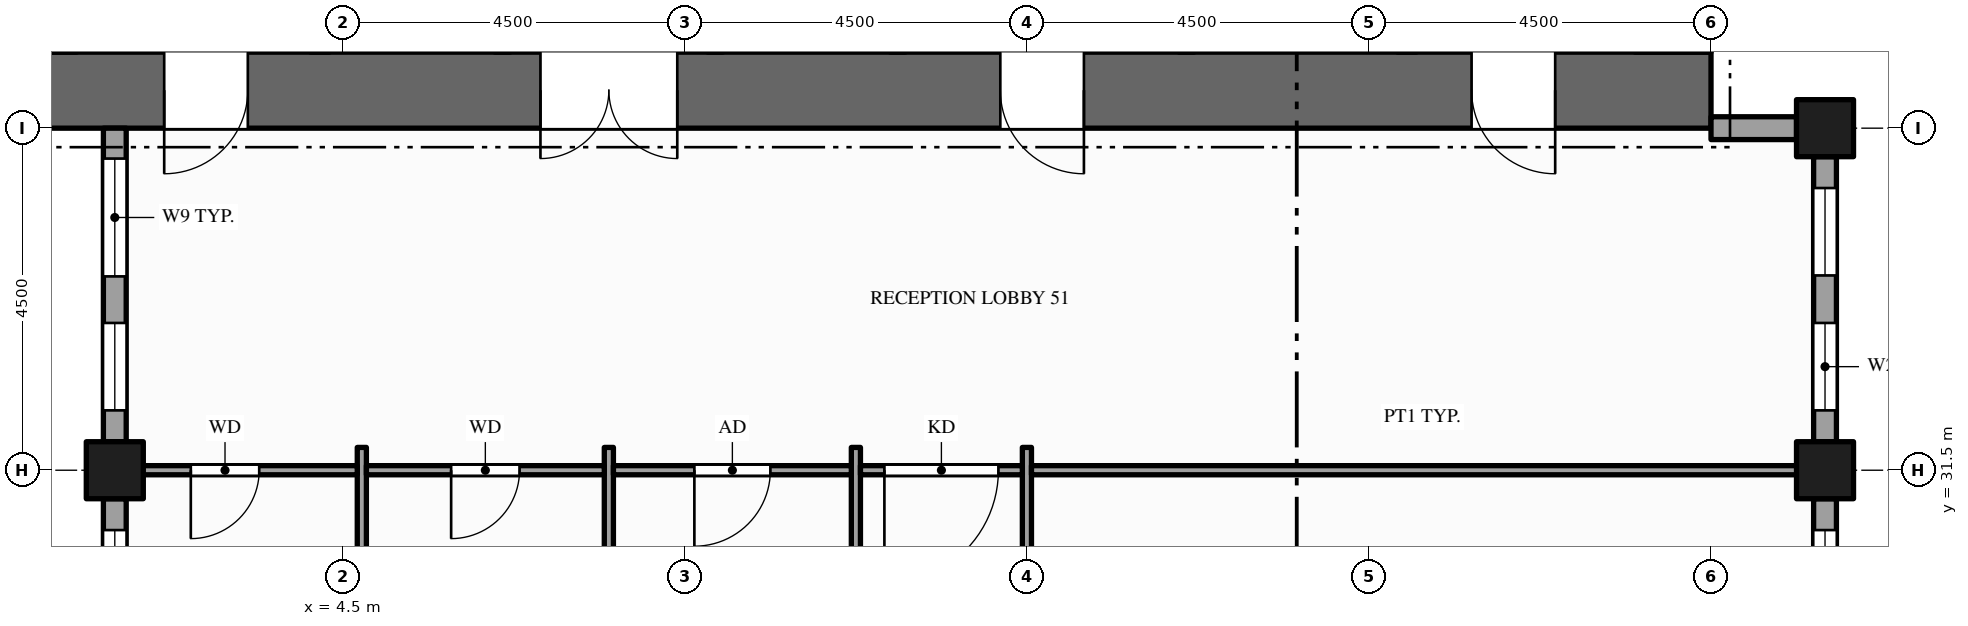
"""IFC4 building model, lengths in metres.
Left out: names, types, materials, properties, quantities, classifications, styles, units other than length and angle.
Written with IfcOpenShell. Run it as: python <this file> out.ifc"""

import sys

from ifc_helpers import new_model, si_unit, direction, frame, frame_2d, origin, origin_2d, place, context, subcontext, project, spatial, rectangle, hollow_rectangle, extrude, element, fill, save


model = new_model("IFC4")
c1 = context("Model", 3, precision=1e-05, world=origin(), true_north=direction((0.0, 1.0)))
c2 = subcontext(c1, "Body", "Model", "MODEL_VIEW")
j1 = project(units=[si_unit("LENGTHUNIT", "METRE"), si_unit("PLANEANGLEUNIT", "RADIAN")], contexts=[c1])
p1 = place(None, origin())
s1 = spatial("IfcSite", under=j1, at=p1, CompositionType="ELEMENT")
p2 = place(p1, origin())
s2 = spatial("IfcBuilding", under=s1, at=p2, CompositionType="ELEMENT")
p3 = place(p2, frame((0.0, 0.0, 207.0)))
s3 = spatial("IfcBuildingStorey", under=s2, at=p3, CompositionType="ELEMENT", Elevation=207.0)
p4 = place(p3, frame((0.0, 36.5, -0.15), z_axis=(0.0, 0.0, 1.0), x_axis=(1.0, 0.0, 0.0)))
e1 = element("IfcWall", 1, at=p4, inside=s3, PredefinedType="SHEAR", context=c2, shape_type="SweptSolid", body=[
    extrude(rectangle(XDim=22.5, YDim=1.0, at=frame_2d((11.25, 0.0))), origin(), (0.0, 0.0, 1.0), 4.0),
])
p5 = place(p4, frame((7.1, 0.0, 0.15)))
e2 = element("IfcOpeningElement", 2, at=p5, cuts=e1, PredefinedType="OPENING", context=c2, shape_type="SweptSolid", body=[
    extrude(rectangle(XDim=1.8, YDim=2.1, at=frame_2d((0.9, 1.05))), frame((0.0, 0.51, 0.0), z_axis=(0.0, -1.0, 0.0), x_axis=(1.0, 0.0, 0.0)), (0.0, 0.0, 1.0), 1.02),
])
p6 = place(p4, frame((13.15, 0.0, 0.15)))
e3 = element("IfcOpeningElement", 3, at=p6, cuts=e1, PredefinedType="OPENING", context=c2, shape_type="SweptSolid", body=[
    extrude(rectangle(XDim=1.1, YDim=2.1, at=frame_2d((0.55, 1.05))), frame((0.0, 0.51, 0.0), z_axis=(0.0, -1.0, 0.0), x_axis=(1.0, 0.0, 0.0)), (0.0, 0.0, 1.0), 1.02),
])
p7 = place(p4, frame((2.15, 0.0, 0.15)))
e4 = element("IfcOpeningElement", 4, at=p7, cuts=e1, PredefinedType="OPENING", context=c2, shape_type="SweptSolid", body=[
    extrude(rectangle(XDim=1.1, YDim=2.1, at=frame_2d((0.55, 1.05))), frame((0.0, 0.51, 0.0), z_axis=(0.0, -1.0, 0.0), x_axis=(1.0, 0.0, 0.0)), (0.0, 0.0, 1.0), 1.02),
])
p8 = place(p4, frame((19.35, 0.0, 0.15)))
e5 = element("IfcOpeningElement", 5, at=p8, cuts=e1, PredefinedType="OPENING", context=c2, shape_type="SweptSolid", body=[
    extrude(rectangle(XDim=1.1, YDim=2.1, at=frame_2d((0.55, 1.05))), frame((0.0, 0.51, 0.0), z_axis=(0.0, -1.0, 0.0), x_axis=(1.0, 0.0, 0.0)), (0.0, 0.0, 1.0), 1.02),
])
for number, where, z_axis, x_axis in (
    (6, (1.5, 31.5, -0.15), (0.0, 0.0, 1.0), (1.0, 0.0, 0.0)),
    (7, (24.0, 31.5, -0.15), (0.0, 0.0, 1.0), (1.0, 0.0, 0.0)),
    (8, (24.0, 36.0, -0.15), (0.0, 0.0, 1.0), (1.0, 0.0, 0.0)),
):
    element("IfcColumn", number, at=place(p3, frame(where, z_axis=z_axis, x_axis=x_axis)), inside=s3, PredefinedType="COLUMN", context=c2, shape_type="SweptSolid", body=[
        extrude(hollow_rectangle(XDim=0.75, YDim=0.75, WallThickness=0.036, at=origin_2d()), origin(), (0.0, 0.0, 1.0), 4.0),
    ])
p9 = place(p3, frame((24.0, 25.875, 0.0), z_axis=(0.0, 0.0, 1.0), x_axis=(0.0, 1.0, 0.0)))
e9 = element("IfcWall", 9, at=p9, inside=s3, PredefinedType="STANDARD", context=c2, shape_type="SweptSolid", body=[
    extrude(rectangle(XDim=5.25, YDim=0.3, at=frame_2d((2.625, 0.0))), origin(), (0.0, 0.0, 1.0), 3.157),
])
p10 = place(p9, frame((1.425, 0.0, 0.9)))
e10 = element("IfcOpeningElement", 10, at=p10, cuts=e9, PredefinedType="OPENING", context=c2, shape_type="SweptSolid", body=[
    extrude(rectangle(XDim=1.65, YDim=2.0, at=frame_2d((0.825, 1.0))), frame((0.0, 0.16, 0.0), z_axis=(0.0, -1.0, 0.0), x_axis=(1.0, 0.0, 0.0)), (0.0, 0.0, 1.0), 0.32),
])
p11 = place(p9, frame((3.688, 0.0, 0.9)))
e11 = element("IfcOpeningElement", 11, at=p11, cuts=e9, PredefinedType="OPENING", context=c2, shape_type="SweptSolid", body=[
    extrude(rectangle(XDim=1.15, YDim=2.0, at=frame_2d((0.575, 1.0))), frame((0.0, 0.16, 0.0), z_axis=(0.0, -1.0, 0.0), x_axis=(1.0, 0.0, 0.0)), (0.0, 0.0, 1.0), 0.32),
])
p12 = place(p3, frame((24.0, 31.875, 0.0), z_axis=(0.0, 0.0, 1.0), x_axis=(0.0, 1.0, 0.0)))
e12 = element("IfcWall", 12, at=p12, inside=s3, PredefinedType="STANDARD", context=c2, shape_type="SweptSolid", body=[
    extrude(rectangle(XDim=3.75, YDim=0.3, at=frame_2d((1.875, 0.0))), origin(), (0.0, 0.0, 1.0), 3.157),
])
p13 = place(p12, frame((0.413, 0.0, 0.9)))
e13 = element("IfcOpeningElement", 13, at=p13, cuts=e12, PredefinedType="OPENING", context=c2, shape_type="SweptSolid", body=[
    extrude(rectangle(XDim=1.15, YDim=2.0, at=frame_2d((0.575, 1.0))), frame((0.0, 0.16, 0.0), z_axis=(0.0, -1.0, 0.0), x_axis=(1.0, 0.0, 0.0)), (0.0, 0.0, 1.0), 0.32),
])
p14 = place(p12, frame((2.188, 0.0, 0.9)))
e14 = element("IfcOpeningElement", 14, at=p14, cuts=e12, PredefinedType="OPENING", context=c2, shape_type="SweptSolid", body=[
    extrude(rectangle(XDim=1.15, YDim=2.0, at=frame_2d((0.575, 1.0))), frame((0.0, 0.16, 0.0), z_axis=(0.0, -1.0, 0.0), x_axis=(1.0, 0.0, 0.0)), (0.0, 0.0, 1.0), 0.32),
])
p15 = place(p3, frame((23.625, 36.0, 0.0), z_axis=(0.0, 0.0, 1.0), x_axis=(-1.0, 0.0, 0.0)))
e15 = element("IfcWall", 15, at=p15, inside=s3, PredefinedType="STANDARD", context=c2, shape_type="SweptSolid", body=[
    extrude(rectangle(XDim=1.125, YDim=0.3, at=frame_2d((0.562, 0.0))), origin(), (0.0, 0.0, 1.0), 2.87),
])
p16 = place(p3, frame((1.5, 36.0, 0.0), z_axis=(0.0, 0.0, 1.0), x_axis=(0.0, -1.0, 0.0)))
e16 = element("IfcWall", 16, at=p16, inside=s3, PredefinedType="STANDARD", context=c2, shape_type="SweptSolid", body=[
    extrude(rectangle(XDim=4.125, YDim=0.3, at=frame_2d((2.062, 0.0))), origin(), (0.0, 0.0, 1.0), 3.157),
])
p17 = place(p16, frame((0.4, 0.0, 0.9)))
e17 = element("IfcOpeningElement", 17, at=p17, cuts=e16, PredefinedType="OPENING", context=c2, shape_type="SweptSolid", body=[
    extrude(rectangle(XDim=1.55, YDim=2.0, at=frame_2d((0.775, 1.0))), frame((0.0, 0.16, 0.0), z_axis=(0.0, -1.0, 0.0), x_axis=(1.0, 0.0, 0.0)), (0.0, 0.0, 1.0), 0.32),
])
p18 = place(p16, frame((2.562, 0.0, 0.9)))
e18 = element("IfcOpeningElement", 18, at=p18, cuts=e16, PredefinedType="OPENING", context=c2, shape_type="SweptSolid", body=[
    extrude(rectangle(XDim=1.15, YDim=2.0, at=frame_2d((0.575, 1.0))), frame((0.0, 0.16, 0.0), z_axis=(0.0, -1.0, 0.0), x_axis=(1.0, 0.0, 0.0)), (0.0, 0.0, 1.0), 0.32),
])
p19 = place(p3, frame((1.5, 31.125, 0.0), z_axis=(0.0, 0.0, 1.0), x_axis=(0.0, -1.0, 0.0)))
e19 = element("IfcWall", 19, at=p19, inside=s3, PredefinedType="STANDARD", context=c2, shape_type="SweptSolid", body=[
    extrude(rectangle(XDim=3.75, YDim=0.3, at=frame_2d((1.875, 0.0))), origin(), (0.0, 0.0, 1.0), 3.157),
])
p20 = place(p19, frame((0.413, 0.0, 0.9)))
e20 = element("IfcOpeningElement", 20, at=p20, cuts=e19, PredefinedType="OPENING", context=c2, shape_type="SweptSolid", body=[
    extrude(rectangle(XDim=1.15, YDim=2.0, at=frame_2d((0.575, 1.0))), frame((0.0, 0.16, 0.0), z_axis=(0.0, -1.0, 0.0), x_axis=(1.0, 0.0, 0.0)), (0.0, 0.0, 1.0), 0.32),
])
p21 = place(p19, frame((2.188, 0.0, 0.9)))
e21 = element("IfcOpeningElement", 21, at=p21, cuts=e19, PredefinedType="OPENING", context=c2, shape_type="SweptSolid", body=[
    extrude(rectangle(XDim=1.15, YDim=2.0, at=frame_2d((0.575, 1.0))), frame((0.0, 0.16, 0.0), z_axis=(0.0, -1.0, 0.0), x_axis=(1.0, 0.0, 0.0)), (0.0, 0.0, 1.0), 0.32),
])
for number, where, z_axis, x_axis in (
    (22, (4.75, 26.7, 0.0), (0.0, 0.0, 1.0), (0.0, 1.0, 0.0)),
    (23, (8.0, 26.7, 0.0), (0.0, 0.0, 1.0), (0.0, 1.0, 0.0)),
):
    element("IfcWall", number, at=place(p3, frame(where, z_axis=z_axis, x_axis=x_axis)), inside=s3, PredefinedType="PARTITIONING", context=c2, shape_type="SweptSolid", body=[
        extrude(rectangle(XDim=5.1, YDim=0.12, at=frame_2d((2.55, 0.0))), origin(), (0.0, 0.0, 1.0), 3.85),
    ])
p22 = place(p3, frame((11.25, 13.2, 0.0), z_axis=(0.0, 0.0, 1.0), x_axis=(0.0, 1.0, 0.0)))
e24 = element("IfcWall", 24, at=p22, inside=s3, PredefinedType="PARTITIONING", context=c2, shape_type="SweptSolid", body=[
    extrude(rectangle(XDim=18.6, YDim=0.12, at=frame_2d((9.3, 0.0))), origin(), (0.0, 0.0, 1.0), 2.6),
])
p23 = place(p22, frame((3.175, 0.0, 0.0)))
e25 = element("IfcOpeningElement", 25, at=p23, cuts=e24, PredefinedType="OPENING", context=c2, shape_type="SweptSolid", body=[
    extrude(rectangle(XDim=1.0, YDim=2.1, at=frame_2d((0.5, 1.05))), frame((0.0, 0.07, 0.0), z_axis=(0.0, -1.0, 0.0), x_axis=(1.0, 0.0, 0.0)), (0.0, 0.0, 1.0), 0.14),
])
p24 = place(p22, frame((9.955, 0.0, 0.0)))
e26 = element("IfcOpeningElement", 26, at=p24, cuts=e24, PredefinedType="OPENING", context=c2, shape_type="SweptSolid", body=[
    extrude(rectangle(XDim=1.0, YDim=2.1, at=frame_2d((0.5, 1.05))), frame((0.0, 0.07, 0.0), z_axis=(0.0, -1.0, 0.0), x_axis=(1.0, 0.0, 0.0)), (0.0, 0.0, 1.0), 0.14),
])
p25 = place(p3, frame((13.5, 13.2, 0.0), z_axis=(0.0, 0.0, 1.0), x_axis=(0.0, 1.0, 0.0)))
e27 = element("IfcWall", 27, at=p25, inside=s3, PredefinedType="PARTITIONING", context=c2, shape_type="SweptSolid", body=[
    extrude(rectangle(XDim=18.6, YDim=0.12, at=frame_2d((9.3, 0.0))), origin(), (0.0, 0.0, 1.0), 2.6),
])
p26 = place(p25, frame((4.2, 0.0, 0.0)))
e28 = element("IfcOpeningElement", 28, at=p26, cuts=e27, PredefinedType="OPENING", context=c2, shape_type="SweptSolid", body=[
    extrude(rectangle(XDim=1.2, YDim=2.1, at=frame_2d((0.6, 1.05))), frame((0.0, 0.07, 0.0), z_axis=(0.0, -1.0, 0.0), x_axis=(1.0, 0.0, 0.0)), (0.0, 0.0, 1.0), 0.14),
])
p27 = place(p3, frame((1.65, 31.5, 0.0), z_axis=(0.0, 0.0, 1.0), x_axis=(1.0, 0.0, 0.0)))
e29 = element("IfcWall", 29, at=p27, inside=s3, PredefinedType="PARTITIONING", context=c2, shape_type="SweptSolid", body=[
    extrude(rectangle(XDim=3.04, YDim=0.12, at=frame_2d((1.52, 0.0))), origin(), (0.0, 0.0, 1.0), 2.87),
])
p28 = place(p27, frame((0.85, 0.0, 0.0)))
e30 = element("IfcOpeningElement", 30, at=p28, cuts=e29, PredefinedType="OPENING", context=c2, shape_type="SweptSolid", body=[
    extrude(rectangle(XDim=0.9, YDim=2.1, at=frame_2d((0.45, 1.05))), frame((0.0, 0.07, 0.0), z_axis=(0.0, -1.0, 0.0), x_axis=(1.0, 0.0, 0.0)), (0.0, 0.0, 1.0), 0.14),
])
p29 = place(p3, frame((4.81, 31.5, 0.0), z_axis=(0.0, 0.0, 1.0), x_axis=(1.0, 0.0, 0.0)))
e31 = element("IfcWall", 31, at=p29, inside=s3, PredefinedType="PARTITIONING", context=c2, shape_type="SweptSolid", body=[
    extrude(rectangle(XDim=3.13, YDim=0.12, at=frame_2d((1.565, 0.0))), origin(), (0.0, 0.0, 1.0), 2.87),
])
p30 = place(p29, frame((1.115, 0.0, 0.0)))
e32 = element("IfcOpeningElement", 32, at=p30, cuts=e31, PredefinedType="OPENING", context=c2, shape_type="SweptSolid", body=[
    extrude(rectangle(XDim=0.9, YDim=2.1, at=frame_2d((0.45, 1.05))), frame((0.0, 0.07, 0.0), z_axis=(0.0, -1.0, 0.0), x_axis=(1.0, 0.0, 0.0)), (0.0, 0.0, 1.0), 0.14),
])
p31 = place(p3, frame((8.06, 31.5, 0.0), z_axis=(0.0, 0.0, 1.0), x_axis=(1.0, 0.0, 0.0)))
e33 = element("IfcWall", 33, at=p31, inside=s3, PredefinedType="PARTITIONING", context=c2, shape_type="SweptSolid", body=[
    extrude(rectangle(XDim=3.13, YDim=0.12, at=frame_2d((1.565, 0.0))), origin(), (0.0, 0.0, 1.0), 2.87),
])
p32 = place(p31, frame((1.065, 0.0, 0.0)))
e34 = element("IfcOpeningElement", 34, at=p32, cuts=e33, PredefinedType="OPENING", context=c2, shape_type="SweptSolid", body=[
    extrude(rectangle(XDim=1.0, YDim=2.1, at=frame_2d((0.5, 1.05))), frame((0.0, 0.07, 0.0), z_axis=(0.0, -1.0, 0.0), x_axis=(1.0, 0.0, 0.0)), (0.0, 0.0, 1.0), 0.14),
])
p33 = place(p3, frame((11.31, 31.5, 0.0), z_axis=(0.0, 0.0, 1.0), x_axis=(1.0, 0.0, 0.0)))
e35 = element("IfcWall", 35, at=p33, inside=s3, PredefinedType="PARTITIONING", context=c2, shape_type="SweptSolid", body=[
    extrude(rectangle(XDim=2.13, YDim=0.12, at=frame_2d((1.065, 0.0))), origin(), (0.0, 0.0, 1.0), 2.87),
])
p34 = place(p33, frame((0.315, 0.0, 0.0)))
e36 = element("IfcOpeningElement", 36, at=p34, cuts=e35, PredefinedType="OPENING", context=c2, shape_type="SweptSolid", body=[
    extrude(rectangle(XDim=1.5, YDim=2.1, at=frame_2d((0.75, 1.05))), frame((0.0, 0.07, 0.0), z_axis=(0.0, -1.0, 0.0), x_axis=(1.0, 0.0, 0.0)), (0.0, 0.0, 1.0), 0.14),
])
p35 = place(p3, frame((13.56, 31.5, 0.0), z_axis=(0.0, 0.0, 1.0), x_axis=(1.0, 0.0, 0.0)))
e37 = element("IfcWall", 37, at=p35, inside=s3, PredefinedType="PARTITIONING", context=c2, shape_type="SweptSolid", body=[
    extrude(rectangle(XDim=10.29, YDim=0.12, at=frame_2d((5.145, 0.0))), origin(), (0.0, 0.0, 1.0), 2.87),
])
p36 = place(p11, origin())
e38 = element("IfcWindow", 38, at=p36, inside=s3, PartitioningType="SINGLE_PANEL", PredefinedType="WINDOW", context=c2, shape_type="SweptSolid", body=[
    extrude(rectangle(XDim=1.15, YDim=2.0, at=frame_2d((0.575, 1.0))), frame((0.0, 0.03, 0.0), z_axis=(0.0, -1.0, 0.0), x_axis=(1.0, 0.0, 0.0)), (0.0, 0.0, 1.0), 0.06),
])
fill(e11, e38)
p37 = place(p13, origin())
e39 = element("IfcWindow", 39, at=p37, inside=s3, PartitioningType="SINGLE_PANEL", PredefinedType="WINDOW", context=c2, shape_type="SweptSolid", body=[
    extrude(rectangle(XDim=1.15, YDim=2.0, at=frame_2d((0.575, 1.0))), frame((0.0, 0.03, 0.0), z_axis=(0.0, -1.0, 0.0), x_axis=(1.0, 0.0, 0.0)), (0.0, 0.0, 1.0), 0.06),
])
fill(e13, e39)
p38 = place(p14, origin())
e40 = element("IfcWindow", 40, at=p38, inside=s3, PartitioningType="SINGLE_PANEL", PredefinedType="WINDOW", context=c2, shape_type="SweptSolid", body=[
    extrude(rectangle(XDim=1.15, YDim=2.0, at=frame_2d((0.575, 1.0))), frame((0.0, 0.03, 0.0), z_axis=(0.0, -1.0, 0.0), x_axis=(1.0, 0.0, 0.0)), (0.0, 0.0, 1.0), 0.06),
])
fill(e14, e40)
p39 = place(p17, origin())
e41 = element("IfcWindow", 41, at=p39, inside=s3, PartitioningType="SINGLE_PANEL", PredefinedType="WINDOW", context=c2, shape_type="SweptSolid", body=[
    extrude(rectangle(XDim=1.55, YDim=2.0, at=frame_2d((0.775, 1.0))), frame((0.0, 0.03, 0.0), z_axis=(0.0, -1.0, 0.0), x_axis=(1.0, 0.0, 0.0)), (0.0, 0.0, 1.0), 0.06),
])
fill(e17, e41)
p40 = place(p18, origin())
e42 = element("IfcWindow", 42, at=p40, inside=s3, PartitioningType="SINGLE_PANEL", PredefinedType="WINDOW", context=c2, shape_type="SweptSolid", body=[
    extrude(rectangle(XDim=1.15, YDim=2.0, at=frame_2d((0.575, 1.0))), frame((0.0, 0.03, 0.0), z_axis=(0.0, -1.0, 0.0), x_axis=(1.0, 0.0, 0.0)), (0.0, 0.0, 1.0), 0.06),
])
fill(e18, e42)
p41 = place(p20, origin())
e43 = element("IfcWindow", 43, at=p41, inside=s3, PartitioningType="SINGLE_PANEL", PredefinedType="WINDOW", context=c2, shape_type="SweptSolid", body=[
    extrude(rectangle(XDim=1.15, YDim=2.0, at=frame_2d((0.575, 1.0))), frame((0.0, 0.03, 0.0), z_axis=(0.0, -1.0, 0.0), x_axis=(1.0, 0.0, 0.0)), (0.0, 0.0, 1.0), 0.06),
])
fill(e20, e43)
p42 = place(p5, origin())
e44 = element("IfcDoor", 44, at=p42, inside=s3, OperationType="DOUBLE_DOOR_SINGLE_SWING", PredefinedType="DOOR", context=c2, shape_type="SweptSolid", body=[
    extrude(rectangle(XDim=1.8, YDim=2.1, at=frame_2d((0.9, 1.05))), frame((0.0, 0.025, 0.0), z_axis=(0.0, -1.0, 0.0), x_axis=(1.0, 0.0, 0.0)), (0.0, 0.0, 1.0), 0.05),
])
fill(e2, e44)
p43 = place(p6, origin())
e45 = element("IfcDoor", 45, at=p43, inside=s3, OperationType="SINGLE_SWING_RIGHT", PredefinedType="DOOR", context=c2, shape_type="SweptSolid", body=[
    extrude(rectangle(XDim=1.1, YDim=2.1, at=frame_2d((0.55, 1.05))), frame((0.0, 0.025, 0.0), z_axis=(0.0, -1.0, 0.0), x_axis=(1.0, 0.0, 0.0)), (0.0, 0.0, 1.0), 0.05),
])
fill(e3, e45)
p44 = place(p7, origin())
e46 = element("IfcDoor", 46, at=p44, inside=s3, OperationType="SINGLE_SWING_LEFT", PredefinedType="DOOR", context=c2, shape_type="SweptSolid", body=[
    extrude(rectangle(XDim=1.1, YDim=2.1, at=frame_2d((0.55, 1.05))), frame((0.0, 0.025, 0.0), z_axis=(0.0, -1.0, 0.0), x_axis=(1.0, 0.0, 0.0)), (0.0, 0.0, 1.0), 0.05),
])
fill(e4, e46)
p45 = place(p8, origin())
e47 = element("IfcDoor", 47, at=p45, inside=s3, OperationType="SINGLE_SWING_RIGHT", PredefinedType="DOOR", context=c2, shape_type="SweptSolid", body=[
    extrude(rectangle(XDim=1.1, YDim=2.1, at=frame_2d((0.55, 1.05))), frame((0.0, 0.025, 0.0), z_axis=(0.0, -1.0, 0.0), x_axis=(1.0, 0.0, 0.0)), (0.0, 0.0, 1.0), 0.05),
])
fill(e5, e47)
p46 = place(p34, origin())
e48 = element("IfcDoor", 48, at=p46, inside=s3, OperationType="SINGLE_SWING_LEFT", PredefinedType="DOOR", context=c2, shape_type="SweptSolid", body=[
    extrude(rectangle(XDim=1.5, YDim=2.1, at=frame_2d((0.75, 1.05))), frame((0.0, 0.025, 0.0), z_axis=(0.0, -1.0, 0.0), x_axis=(1.0, 0.0, 0.0)), (0.0, 0.0, 1.0), 0.05),
])
fill(e36, e48)
p47 = place(p28, origin())
e49 = element("IfcDoor", 49, at=p47, inside=s3, OperationType="SINGLE_SWING_LEFT", PredefinedType="DOOR", context=c2, shape_type="SweptSolid", body=[
    extrude(rectangle(XDim=0.9, YDim=2.1, at=frame_2d((0.45, 1.05))), frame((0.0, 0.025, 0.0), z_axis=(0.0, -1.0, 0.0), x_axis=(1.0, 0.0, 0.0)), (0.0, 0.0, 1.0), 0.05),
])
fill(e30, e49)
p48 = place(p30, origin())
e50 = element("IfcDoor", 50, at=p48, inside=s3, OperationType="SINGLE_SWING_LEFT", PredefinedType="DOOR", context=c2, shape_type="SweptSolid", body=[
    extrude(rectangle(XDim=0.9, YDim=2.1, at=frame_2d((0.45, 1.05))), frame((0.0, 0.025, 0.0), z_axis=(0.0, -1.0, 0.0), x_axis=(1.0, 0.0, 0.0)), (0.0, 0.0, 1.0), 0.05),
])
fill(e32, e50)
p49 = place(p32, origin())
e51 = element("IfcDoor", 51, at=p49, inside=s3, OperationType="SINGLE_SWING_LEFT", PredefinedType="DOOR", context=c2, shape_type="SweptSolid", body=[
    extrude(rectangle(XDim=1.0, YDim=2.1, at=frame_2d((0.5, 1.05))), frame((0.0, 0.025, 0.0), z_axis=(0.0, -1.0, 0.0), x_axis=(1.0, 0.0, 0.0)), (0.0, 0.0, 1.0), 0.05),
])
fill(e34, e51)
save(model, sys.argv[1])
